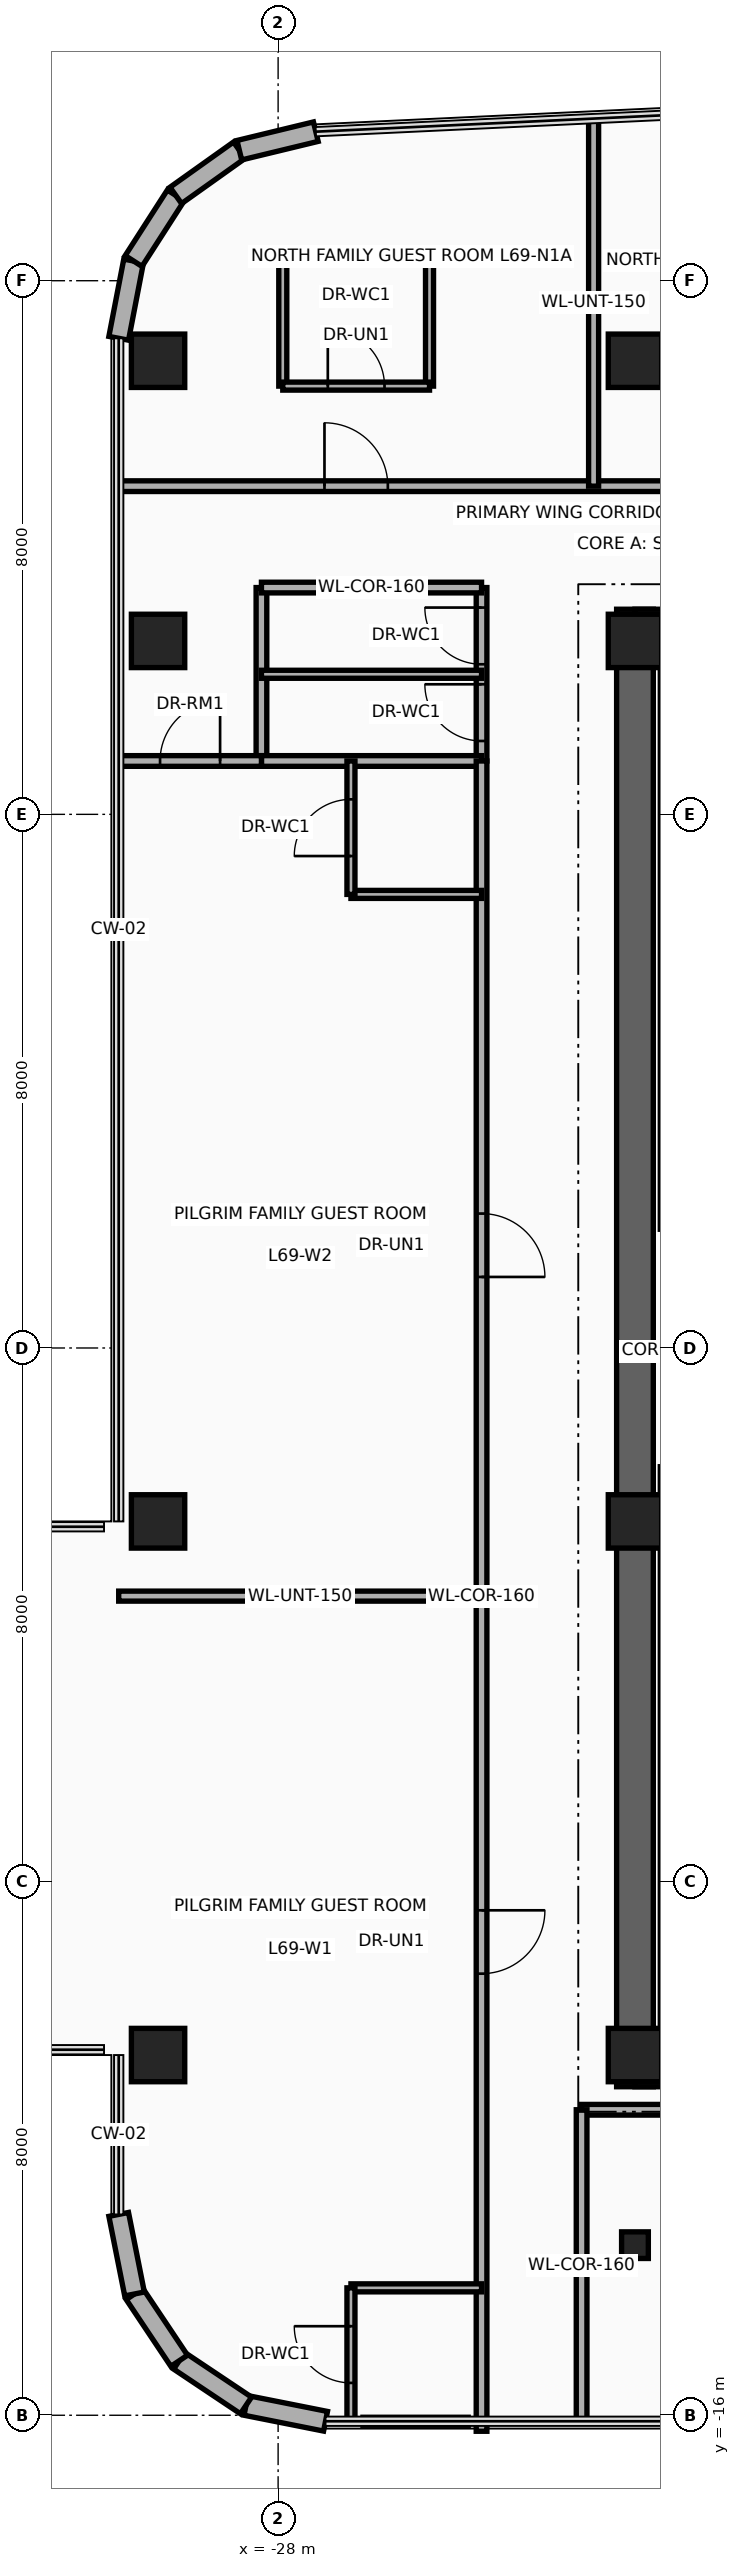
"""IFC4 building model, lengths in metres.
Left out: names, types, materials, properties, quantities, classifications, styles, units other than length and angle.
Written with IfcOpenShell. Run it as: python <this file> out.ifc"""

import sys

from ifc_helpers import new_model, si_unit, direction, frame, frame_2d, origin, origin_2d, place, context, subcontext, project, spatial, rectangle, i_section, extrude, source, transform, mapped, element, fill, save


model = new_model("IFC4")
c1 = context("Model", 3, precision=1e-05, world=origin(), true_north=direction((0.0, 1.0)))
c2 = subcontext(c1, "Body", "Model", "MODEL_VIEW")
j1 = project(units=[si_unit("LENGTHUNIT", "METRE"), si_unit("PLANEANGLEUNIT", "RADIAN")], contexts=[c1])
p1 = place(None, origin())
s1 = spatial("IfcSite", under=j1, at=p1, CompositionType="ELEMENT")
p2 = place(p1, origin())
s2 = spatial("IfcBuilding", under=s1, at=p2, CompositionType="ELEMENT")
p3 = place(p2, frame((0.0, 0.0, 266.0)))
s3 = spatial("IfcBuildingStorey", under=s2, at=p3, CompositionType="ELEMENT", Elevation=266.0)
p4 = place(p3, frame((-22.65, -11.075, 0.0), z_axis=(0.0, 0.0, 1.0), x_axis=(0.0, 1.0, 0.0)))
e1 = element("IfcWall", 1, at=p4, inside=s3, PredefinedType="SHEAR", context=c2, shape_type="SweptSolid", body=[
    extrude(rectangle(XDim=22.15, YDim=0.55, at=frame_2d((11.075, 0.0))), origin(), (0.0, 0.0, 1.0), 3.26),
])
for number, where, z_axis, x_axis in (
    (2, (-22.65, 10.8, 0.0), (0.0, 0.0, 1.0), (1.0, 0.0, 0.0)),
    (3, (-22.65, -10.8, 0.0), (0.0, 0.0, 1.0), (1.0, 0.0, 0.0)),
):
    element("IfcWall", number, at=place(p3, frame(where, z_axis=z_axis, x_axis=x_axis)), inside=s3, PredefinedType="SHEAR", context=c2, shape_type="SweptSolid", body=[
        extrude(rectangle(XDim=10.25, YDim=0.55, at=frame_2d((5.125, 0.0))), origin(), (0.0, 0.0, 1.0), 3.26),
    ])
m1 = source(origin(), c2, "Body", "SweptSolid", [
    extrude(rectangle(XDim=0.8, YDim=0.8, at=origin_2d()), origin(), (0.0, 0.0, 1.0), 3.5),
])
for number, where, z_axis, x_axis in (
    (4, (-29.8, -10.6, 0.0), (0.0, 0.0, 1.0), (1.0, 0.0, 0.0)),
    (5, (-22.65, -10.6, 0.0), (0.0, 0.0, 1.0), (1.0, 0.0, 0.0)),
    (6, (-29.8, -2.6, 0.0), (0.0, 0.0, 1.0), (1.0, 0.0, 0.0)),
    (7, (-22.65, -2.6, 0.0), (0.0, 0.0, 1.0), (1.0, 0.0, 0.0)),
    (8, (-29.8, 10.6, 0.0), (0.0, 0.0, 1.0), (1.0, 0.0, 0.0)),
    (9, (-22.65, 10.6, 0.0), (0.0, 0.0, 1.0), (1.0, 0.0, 0.0)),
    (10, (-29.8, 14.8, 0.0), (0.0, 0.0, 1.0), (1.0, 0.0, 0.0)),
    (11, (-22.65, 14.8, 0.0), (0.0, 0.0, 1.0), (1.0, 0.0, 0.0)),
):
    element("IfcColumn", number, at=place(p3, frame(where, z_axis=z_axis, x_axis=x_axis)), inside=s3, PredefinedType="COLUMN", context=c2, shape_type="MappedRepresentation", body=[
        mapped(m1, transform((0.0, 0.0, 0.0), x_axis=(1.0, 0.0, 0.0), y_axis=(0.0, 1.0, 0.0), z_axis=(0.0, 0.0, 1.0), scale=1.0)),
    ])
m2 = source(origin(), c2, "Body", "SweptSolid", [
    extrude(i_section(OverallWidth=0.401, OverallDepth=0.399, WebThickness=0.025, FlangeThickness=0.04, at=origin_2d()), origin(), (0.0, 0.0, 1.0), 3.5),
])
p5 = place(p3, frame((-22.65, -13.45, 0.0), z_axis=(0.0, 0.0, 1.0), x_axis=(1.0, 0.0, 0.0)))
e12 = element("IfcColumn", 12, at=p5, inside=s3, PredefinedType="COLUMN", context=c2, shape_type="MappedRepresentation", body=[
    mapped(m2, transform((0.0, 0.0, 0.0), x_axis=(1.0, 0.0, 0.0), y_axis=(0.0, 1.0, 0.0), z_axis=(0.0, 0.0, 1.0), scale=1.0)),
])
p6 = place(p3, frame((-30.39, 15.137, 0.0), z_axis=(0.0, 0.0, 1.0), x_axis=(0.189307792679, 0.981917796779, 0.0)))
e13 = element("IfcWall", 13, at=p6, inside=s3, PredefinedType="SOLIDWALL", context=c2, shape_type="SweptSolid", body=[
    extrude(rectangle(XDim=1.18, YDim=0.3, at=frame_2d((0.59, 0.0))), origin(), (0.0, 0.0, 1.0), 3.26),
])
p7 = place(p3, frame((-30.167, 16.295, 0.0), z_axis=(0.0, 0.0, 1.0), x_axis=(0.540842020947, 0.841124193195, 0.0)))
e14 = element("IfcWall", 14, at=p7, inside=s3, PredefinedType="SOLIDWALL", context=c2, shape_type="SweptSolid", body=[
    extrude(rectangle(XDim=1.169, YDim=0.3, at=frame_2d((0.584, 0.0))), origin(), (0.0, 0.0, 1.0), 3.26),
])
p8 = place(p3, frame((-29.534, 17.279, 0.0), z_axis=(0.0, 0.0, 1.0), x_axis=(0.81466371606, 0.579933642527, 0.0)))
e15 = element("IfcWall", 15, at=p8, inside=s3, PredefinedType="SOLIDWALL", context=c2, shape_type="SweptSolid", body=[
    extrude(rectangle(XDim=1.169, YDim=0.3, at=frame_2d((0.584, 0.0))), origin(), (0.0, 0.0, 1.0), 3.26),
])
p9 = place(p3, frame((-28.582, 17.957, 0.0), z_axis=(0.0, 0.0, 1.0), x_axis=(0.971929016595, 0.235274279725, 0.0)))
e16 = element("IfcWall", 16, at=p9, inside=s3, PredefinedType="SOLIDWALL", context=c2, shape_type="SweptSolid", body=[
    extrude(rectangle(XDim=1.18, YDim=0.3, at=frame_2d((0.59, 0.0))), origin(), (0.0, 0.0, 1.0), 3.26),
])
p10 = place(p3, frame((-27.289, -16.09, 0.0), z_axis=(0.0, 0.0, 1.0), x_axis=(-0.980765602568, 0.195189223115, 0.0)))
e17 = element("IfcWall", 17, at=p10, inside=s3, PredefinedType="SOLIDWALL", context=c2, shape_type="SweptSolid", body=[
    extrude(rectangle(XDim=1.216, YDim=0.3, at=frame_2d((0.608, 0.0))), origin(), (0.0, 0.0, 1.0), 3.26),
])
for number, where, z_axis, x_axis in (
    (18, (-28.482, -15.853, 0.0), (0.0, 0.0, 1.0), (-0.831, 0.556, 0.0)),
    (19, (-29.483, -15.183, 0.0), (0.0, 0.0, 1.0), (-0.556, 0.831, 0.0)),
):
    element("IfcWall", number, at=place(p3, frame(where, z_axis=z_axis, x_axis=x_axis)), inside=s3, PredefinedType="SOLIDWALL", context=c2, shape_type="SweptSolid", body=[
        extrude(rectangle(XDim=1.205, YDim=0.3, at=frame_2d((0.603, 0.0))), origin(), (0.0, 0.0, 1.0), 3.26),
    ])
p11 = place(p3, frame((-30.153, -14.182, 0.0), z_axis=(0.0, 0.0, 1.0), x_axis=(-0.194996050505, 0.980804027463, 0.0)))
e20 = element("IfcWall", 20, at=p11, inside=s3, PredefinedType="SOLIDWALL", context=c2, shape_type="SweptSolid", body=[
    extrude(rectangle(XDim=1.216, YDim=0.3, at=frame_2d((0.608, 0.0))), origin(), (0.0, 0.0, 1.0), 3.26),
])
p12 = place(p3, frame((-28.25, 8.8, 0.0), z_axis=(0.0, 0.0, 1.0), x_axis=(0.0, 1.0, 0.0)))
e21 = element("IfcWall", 21, at=p12, inside=s3, PredefinedType="PARTITIONING", context=c2, shape_type="SweptSolid", body=[
    extrude(rectangle(XDim=2.6, YDim=0.16, at=frame_2d((1.3, 0.0))), origin(), (0.0, 0.0, 1.0), 2.623),
])
p13 = place(p3, frame((-24.95, 8.8, 0.0), z_axis=(0.0, 0.0, 1.0), x_axis=(0.0, 1.0, 0.0)))
e22 = element("IfcWall", 22, at=p13, inside=s3, PredefinedType="PARTITIONING", context=c2, shape_type="SweptSolid", body=[
    extrude(rectangle(XDim=2.6, YDim=0.16, at=frame_2d((1.3, 0.0))), origin(), (0.0, 0.0, 1.0), 2.623),
])
p14 = place(p13, frame((0.3, 0.0, 0.0)))
e23 = element("IfcOpeningElement", 23, at=p14, cuts=e22, PredefinedType="OPENING", context=c2, shape_type="SweptSolid", body=[
    extrude(rectangle(XDim=0.85, YDim=2.1, at=frame_2d((0.425, 1.05))), frame((0.0, 0.095, 0.0), z_axis=(0.0, -1.0, 0.0), x_axis=(1.0, 0.0, 0.0)), (0.0, 0.0, 1.0), 0.19),
])
p15 = place(p13, frame((1.45, 0.0, 0.0)))
e24 = element("IfcOpeningElement", 24, at=p15, cuts=e22, PredefinedType="OPENING", context=c2, shape_type="SweptSolid", body=[
    extrude(rectangle(XDim=0.85, YDim=2.1, at=frame_2d((0.425, 1.05))), frame((0.0, 0.095, 0.0), z_axis=(0.0, -1.0, 0.0), x_axis=(1.0, 0.0, 0.0)), (0.0, 0.0, 1.0), 0.19),
])
for number, where, z_axis, x_axis in (
    (25, (-28.25, 8.8, 0.0), (0.0, 0.0, 1.0), (1.0, 0.0, 0.0)),
    (26, (-28.25, 11.4, 0.0), (0.0, 0.0, 1.0), (1.0, 0.0, 0.0)),
):
    element("IfcWall", number, at=place(p3, frame(where, z_axis=z_axis, x_axis=x_axis)), inside=s3, PredefinedType="PARTITIONING", context=c2, shape_type="SweptSolid", body=[
        extrude(rectangle(XDim=3.3, YDim=0.16, at=frame_2d((1.65, 0.0))), origin(), (0.0, 0.0, 1.0), 3.26),
    ])
p16 = place(p3, frame((-28.25, 10.1, 0.0), z_axis=(0.0, 0.0, 1.0), x_axis=(1.0, 0.0, 0.0)))
e27 = element("IfcWall", 27, at=p16, inside=s3, PredefinedType="PARTITIONING", context=c2, shape_type="SweptSolid", body=[
    extrude(rectangle(XDim=3.3, YDim=0.12, at=frame_2d((1.65, 0.0))), origin(), (0.0, 0.0, 1.0), 3.26),
])
p17 = place(p3, frame((-23.45, -11.42, 0.0), z_axis=(0.0, 0.0, 1.0), x_axis=(1.0, 0.0, 0.0)))
e28 = element("IfcWall", 28, at=p17, inside=s3, PredefinedType="PARTITIONING", context=c2, shape_type="SweptSolid", body=[
    extrude(rectangle(XDim=13.84, YDim=0.16, at=frame_2d((6.92, 0.0))), origin(), (0.0, 0.0, 1.0), 2.634),
])
p18 = place(p3, frame((-23.45, -16.09, 0.0), z_axis=(0.0, 0.0, 1.0), x_axis=(0.0, 1.0, 0.0)))
e29 = element("IfcWall", 29, at=p18, inside=s3, PredefinedType="PARTITIONING", context=c2, shape_type="SweptSolid", body=[
    extrude(rectangle(XDim=4.67, YDim=0.16, at=frame_2d((2.335, 0.0))), origin(), (0.0, 0.0, 1.0), 3.26),
])
p19 = place(p3, frame((-24.95, -16.24, 0.0), z_axis=(0.0, 0.0, 1.0), x_axis=(0.0, 1.0, 0.0)))
e30 = element("IfcWall", 30, at=p19, inside=s3, PredefinedType="PARTITIONING", context=c2, shape_type="SweptSolid", body=[
    extrude(rectangle(XDim=25.04, YDim=0.16, at=frame_2d((12.52, 0.0))), origin(), (0.0, 0.0, 1.0), 2.623),
])
p20 = place(p19, frame((6.86, 0.0, 0.0)))
e31 = element("IfcOpeningElement", 31, at=p20, cuts=e30, PredefinedType="OPENING", context=c2, shape_type="SweptSolid", body=[
    extrude(rectangle(XDim=0.95, YDim=2.15, at=frame_2d((0.475, 1.075))), frame((0.0, 0.095, 0.0), z_axis=(0.0, -1.0, 0.0), x_axis=(1.0, 0.0, 0.0)), (0.0, 0.0, 1.0), 0.19),
])
p21 = place(p19, frame((17.305, 0.0, 0.0)))
e32 = element("IfcOpeningElement", 32, at=p21, cuts=e30, PredefinedType="OPENING", context=c2, shape_type="SweptSolid", body=[
    extrude(rectangle(XDim=0.95, YDim=2.15, at=frame_2d((0.475, 1.075))), frame((0.0, 0.095, 0.0), z_axis=(0.0, -1.0, 0.0), x_axis=(1.0, 0.0, 0.0)), (0.0, 0.0, 1.0), 0.19),
])
p22 = place(p3, frame((-30.39, 8.8, 0.0), z_axis=(0.0, 0.0, 1.0), x_axis=(1.0, 0.0, 0.0)))
e33 = element("IfcWall", 33, at=p22, inside=s3, PredefinedType="PARTITIONING", context=c2, shape_type="SweptSolid", body=[
    extrude(rectangle(XDim=2.14, YDim=0.16, at=frame_2d((1.07, 0.0))), origin(), (0.0, 0.0, 1.0), 2.706),
])
p23 = place(p22, frame((0.62, 0.0, 0.0)))
e34 = element("IfcOpeningElement", 34, at=p23, cuts=e33, PredefinedType="OPENING", context=c2, shape_type="SweptSolid", body=[
    extrude(rectangle(XDim=0.9, YDim=2.1, at=frame_2d((0.45, 1.05))), frame((0.0, 0.095, 0.0), z_axis=(0.0, -1.0, 0.0), x_axis=(1.0, 0.0, 0.0)), (0.0, 0.0, 1.0), 0.19),
])
p24 = place(p3, frame((-30.39, -3.72, 0.0), z_axis=(0.0, 0.0, 1.0), x_axis=(1.0, 0.0, 0.0)))
e35 = element("IfcWall", 35, at=p24, inside=s3, PredefinedType="PARTITIONING", context=c2, shape_type="SweptSolid", body=[
    extrude(rectangle(XDim=5.44, YDim=0.15, at=frame_2d((2.72, 0.0))), origin(), (0.0, 0.0, 1.0), 2.706),
])
p25 = place(p3, frame((-26.908, -14.09, 0.0), z_axis=(0.0, 0.0, 1.0), x_axis=(1.0, 0.0, 0.0)))
e36 = element("IfcWall", 36, at=p25, inside=s3, PredefinedType="PARTITIONING", context=c2, shape_type="SweptSolid", body=[
    extrude(rectangle(XDim=1.958, YDim=0.12, at=frame_2d((0.979, 0.0))), origin(), (0.0, 0.0, 1.0), 3.26),
])
p26 = place(p3, frame((-26.908, -16.09, 0.0), z_axis=(0.0, 0.0, 1.0), x_axis=(0.0, 1.0, 0.0)))
e37 = element("IfcWall", 37, at=p26, inside=s3, PredefinedType="PARTITIONING", context=c2, shape_type="SweptSolid", body=[
    extrude(rectangle(XDim=2.0, YDim=0.12, at=frame_2d((1.0, 0.0))), origin(), (0.0, 0.0, 1.0), 3.26),
])
p27 = place(p26, frame((0.575, 0.0, 0.0)))
e38 = element("IfcOpeningElement", 38, at=p27, cuts=e37, PredefinedType="OPENING", context=c2, shape_type="SweptSolid", body=[
    extrude(rectangle(XDim=0.85, YDim=2.1, at=frame_2d((0.425, 1.05))), frame((0.0, 0.075, 0.0), z_axis=(0.0, -1.0, 0.0), x_axis=(1.0, 0.0, 0.0)), (0.0, 0.0, 1.0), 0.15),
])
p28 = place(p3, frame((-26.728, -16.09, 0.0), z_axis=(0.0, 0.0, 1.0), x_axis=(1.0, 0.0, 0.0)))
e39 = element("IfcWall", 39, at=p28, inside=s3, PredefinedType="PARTITIONING", context=c2, shape_type="SweptSolid", body=[
    extrude(rectangle(XDim=1.578, YDim=0.12, at=frame_2d((0.789, 0.0))), origin(), (0.0, 0.0, 1.0), 3.26),
])
p29 = place(p3, frame((-26.908, 6.8, 0.0), z_axis=(0.0, 0.0, 1.0), x_axis=(1.0, 0.0, 0.0)))
e40 = element("IfcWall", 40, at=p29, inside=s3, PredefinedType="PARTITIONING", context=c2, shape_type="SweptSolid", body=[
    extrude(rectangle(XDim=1.958, YDim=0.12, at=frame_2d((0.979, 0.0))), origin(), (0.0, 0.0, 1.0), 2.839),
])
p30 = place(p3, frame((-26.908, 6.8, 0.0), z_axis=(0.0, 0.0, 1.0), x_axis=(0.0, 1.0, 0.0)))
e41 = element("IfcWall", 41, at=p30, inside=s3, PredefinedType="PARTITIONING", context=c2, shape_type="SweptSolid", body=[
    extrude(rectangle(XDim=2.0, YDim=0.12, at=frame_2d((1.0, 0.0))), origin(), (0.0, 0.0, 1.0), 2.839),
])
p31 = place(p30, frame((0.575, 0.0, 0.0)))
e42 = element("IfcOpeningElement", 42, at=p31, cuts=e41, PredefinedType="OPENING", context=c2, shape_type="SweptSolid", body=[
    extrude(rectangle(XDim=0.85, YDim=2.1, at=frame_2d((0.425, 1.05))), frame((0.0, 0.075, 0.0), z_axis=(0.0, -1.0, 0.0), x_axis=(1.0, 0.0, 0.0)), (0.0, 0.0, 1.0), 0.15),
])
p32 = place(p3, frame((-30.39, 12.92, 0.0), z_axis=(0.0, 0.0, 1.0), x_axis=(1.0, 0.0, 0.0)))
e43 = element("IfcWall", 43, at=p32, inside=s3, PredefinedType="PARTITIONING", context=c2, shape_type="SweptSolid", body=[
    extrude(rectangle(XDim=29.48, YDim=0.16, at=frame_2d((14.74, 0.0))), origin(), (0.0, 0.0, 1.0), 2.634),
])
p33 = place(p32, frame((3.085, 0.0, 0.0)))
e44 = element("IfcOpeningElement", 44, at=p33, cuts=e43, PredefinedType="OPENING", context=c2, shape_type="SweptSolid", body=[
    extrude(rectangle(XDim=0.95, YDim=2.15, at=frame_2d((0.475, 1.075))), frame((0.0, 0.095, 0.0), z_axis=(0.0, -1.0, 0.0), x_axis=(1.0, 0.0, 0.0)), (0.0, 0.0, 1.0), 0.19),
])
p34 = place(p32, frame((9.105, 0.0, 0.0)))
e45 = element("IfcOpeningElement", 45, at=p34, cuts=e43, PredefinedType="OPENING", context=c2, shape_type="SweptSolid", body=[
    extrude(rectangle(XDim=0.95, YDim=2.15, at=frame_2d((0.475, 1.075))), frame((0.0, 0.095, 0.0), z_axis=(0.0, -1.0, 0.0), x_axis=(1.0, 0.0, 0.0)), (0.0, 0.0, 1.0), 0.19),
])
p35 = place(p32, frame((17.27, 0.0, 0.0)))
e46 = element("IfcOpeningElement", 46, at=p35, cuts=e43, PredefinedType="OPENING", context=c2, shape_type="SweptSolid", body=[
    extrude(rectangle(XDim=0.95, YDim=2.15, at=frame_2d((0.475, 1.075))), frame((0.0, 0.095, 0.0), z_axis=(0.0, -1.0, 0.0), x_axis=(1.0, 0.0, 0.0)), (0.0, 0.0, 1.0), 0.19),
])
p36 = place(p3, frame((-23.27, 12.92, 0.0), z_axis=(0.0, 0.0, 1.0), x_axis=(0.0, 1.0, 0.0)))
e47 = element("IfcWall", 47, at=p36, inside=s3, PredefinedType="PARTITIONING", context=c2, shape_type="SweptSolid", body=[
    extrude(rectangle(XDim=5.511, YDim=0.15, at=frame_2d((2.755, 0.0))), origin(), (0.0, 0.0, 1.0), 2.623),
])
for number, where, z_axis, x_axis in (
    (48, (-27.93, 14.42, 0.0), (0.0, 0.0, 1.0), (0.0, 1.0, 0.0)),
    (49, (-25.73, 14.42, 0.0), (0.0, 0.0, 1.0), (0.0, 1.0, 0.0)),
):
    element("IfcWall", number, at=place(p3, frame(where, z_axis=z_axis, x_axis=x_axis)), inside=s3, PredefinedType="PARTITIONING", context=c2, shape_type="SweptSolid", body=[
        extrude(rectangle(XDim=1.984, YDim=0.12, at=frame_2d((0.992, 0.0))), origin(), (0.0, 0.0, 1.0), 2.623),
    ])
p37 = place(p3, frame((-27.93, 16.404, 0.0), z_axis=(0.0, 0.0, 1.0), x_axis=(1.0, 0.0, 0.0)))
e50 = element("IfcWall", 50, at=p37, inside=s3, PredefinedType="PARTITIONING", context=c2, shape_type="SweptSolid", body=[
    extrude(rectangle(XDim=2.2, YDim=0.12, at=frame_2d((1.1, 0.0))), origin(), (0.0, 0.0, 1.0), 3.26),
])
p38 = place(p3, frame((-27.93, 14.42, 0.0), z_axis=(0.0, 0.0, 1.0), x_axis=(1.0, 0.0, 0.0)))
e51 = element("IfcWall", 51, at=p38, inside=s3, PredefinedType="PARTITIONING", context=c2, shape_type="SweptSolid", body=[
    extrude(rectangle(XDim=2.2, YDim=0.12, at=frame_2d((1.1, 0.0))), origin(), (0.0, 0.0, 1.0), 3.26),
])
p39 = place(p38, frame((0.675, 0.0, 0.0)))
e52 = element("IfcOpeningElement", 52, at=p39, cuts=e51, PredefinedType="OPENING", context=c2, shape_type="SweptSolid", body=[
    extrude(rectangle(XDim=0.85, YDim=2.1, at=frame_2d((0.425, 1.05))), frame((0.0, 0.075, 0.0), z_axis=(0.0, -1.0, 0.0), x_axis=(1.0, 0.0, 0.0)), (0.0, 0.0, 1.0), 0.15),
])
p40 = place(p14, origin())
e53 = element("IfcDoor", 53, at=p40, inside=s3, OperationType="SINGLE_SWING_RIGHT", PredefinedType="DOOR", context=c2, shape_type="SweptSolid", body=[
    extrude(rectangle(XDim=0.85, YDim=2.1, at=frame_2d((0.425, 1.05))), frame((0.0, 0.025, 0.0), z_axis=(0.0, -1.0, 0.0), x_axis=(1.0, 0.0, 0.0)), (0.0, 0.0, 1.0), 0.05),
])
fill(e23, e53)
p41 = place(p15, origin())
e54 = element("IfcDoor", 54, at=p41, inside=s3, OperationType="SINGLE_SWING_LEFT", PredefinedType="DOOR", context=c2, shape_type="SweptSolid", body=[
    extrude(rectangle(XDim=0.85, YDim=2.1, at=frame_2d((0.425, 1.05))), frame((0.0, 0.025, 0.0), z_axis=(0.0, -1.0, 0.0), x_axis=(1.0, 0.0, 0.0)), (0.0, 0.0, 1.0), 0.05),
])
fill(e24, e54)
p42 = place(p23, origin())
e55 = element("IfcDoor", 55, at=p42, inside=s3, OperationType="SINGLE_SWING_RIGHT", PredefinedType="DOOR", context=c2, shape_type="SweptSolid", body=[
    extrude(rectangle(XDim=0.9, YDim=2.1, at=frame_2d((0.45, 1.05))), frame((0.0, 0.025, 0.0), z_axis=(0.0, -1.0, 0.0), x_axis=(1.0, 0.0, 0.0)), (0.0, 0.0, 1.0), 0.05),
])
fill(e34, e55)
p43 = place(p20, frame((0.95, 0.0, 0.0), z_axis=(0.0, 0.0, 1.0), x_axis=(-1.0, 0.0, 0.0)))
e56 = element("IfcDoor", 56, at=p43, inside=s3, OperationType="SINGLE_SWING_LEFT", PredefinedType="DOOR", context=c2, shape_type="SweptSolid", body=[
    extrude(rectangle(XDim=0.95, YDim=2.15, at=frame_2d((0.475, 1.075))), frame((0.0, 0.025, 0.0), z_axis=(0.0, -1.0, 0.0), x_axis=(1.0, 0.0, 0.0)), (0.0, 0.0, 1.0), 0.05),
])
fill(e31, e56)
p44 = place(p27, origin())
e57 = element("IfcDoor", 57, at=p44, inside=s3, OperationType="SINGLE_SWING_RIGHT", PredefinedType="DOOR", context=c2, shape_type="SweptSolid", body=[
    extrude(rectangle(XDim=0.85, YDim=2.1, at=frame_2d((0.425, 1.05))), frame((0.0, 0.025, 0.0), z_axis=(0.0, -1.0, 0.0), x_axis=(1.0, 0.0, 0.0)), (0.0, 0.0, 1.0), 0.05),
])
fill(e38, e57)
p45 = place(p21, frame((0.95, 0.0, 0.0), z_axis=(0.0, 0.0, 1.0), x_axis=(-1.0, 0.0, 0.0)))
e58 = element("IfcDoor", 58, at=p45, inside=s3, OperationType="SINGLE_SWING_LEFT", PredefinedType="DOOR", context=c2, shape_type="SweptSolid", body=[
    extrude(rectangle(XDim=0.95, YDim=2.15, at=frame_2d((0.475, 1.075))), frame((0.0, 0.025, 0.0), z_axis=(0.0, -1.0, 0.0), x_axis=(1.0, 0.0, 0.0)), (0.0, 0.0, 1.0), 0.05),
])
fill(e32, e58)
p46 = place(p31, origin())
e59 = element("IfcDoor", 59, at=p46, inside=s3, OperationType="SINGLE_SWING_RIGHT", PredefinedType="DOOR", context=c2, shape_type="SweptSolid", body=[
    extrude(rectangle(XDim=0.85, YDim=2.1, at=frame_2d((0.425, 1.05))), frame((0.0, 0.025, 0.0), z_axis=(0.0, -1.0, 0.0), x_axis=(1.0, 0.0, 0.0)), (0.0, 0.0, 1.0), 0.05),
])
fill(e42, e59)
p47 = place(p33, origin())
e60 = element("IfcDoor", 60, at=p47, inside=s3, OperationType="SINGLE_SWING_RIGHT", PredefinedType="DOOR", context=c2, shape_type="SweptSolid", body=[
    extrude(rectangle(XDim=0.95, YDim=2.15, at=frame_2d((0.475, 1.075))), frame((0.0, 0.025, 0.0), z_axis=(0.0, -1.0, 0.0), x_axis=(1.0, 0.0, 0.0)), (0.0, 0.0, 1.0), 0.05),
])
fill(e44, e60)
p48 = place(p39, origin())
e61 = element("IfcDoor", 61, at=p48, inside=s3, OperationType="SINGLE_SWING_LEFT", PredefinedType="DOOR", context=c2, shape_type="SweptSolid", body=[
    extrude(rectangle(XDim=0.85, YDim=2.1, at=frame_2d((0.425, 1.05))), frame((0.0, 0.025, 0.0), z_axis=(0.0, -1.0, 0.0), x_axis=(1.0, 0.0, 0.0)), (0.0, 0.0, 1.0), 0.05),
])
fill(e52, e61)
save(model, sys.argv[1])
